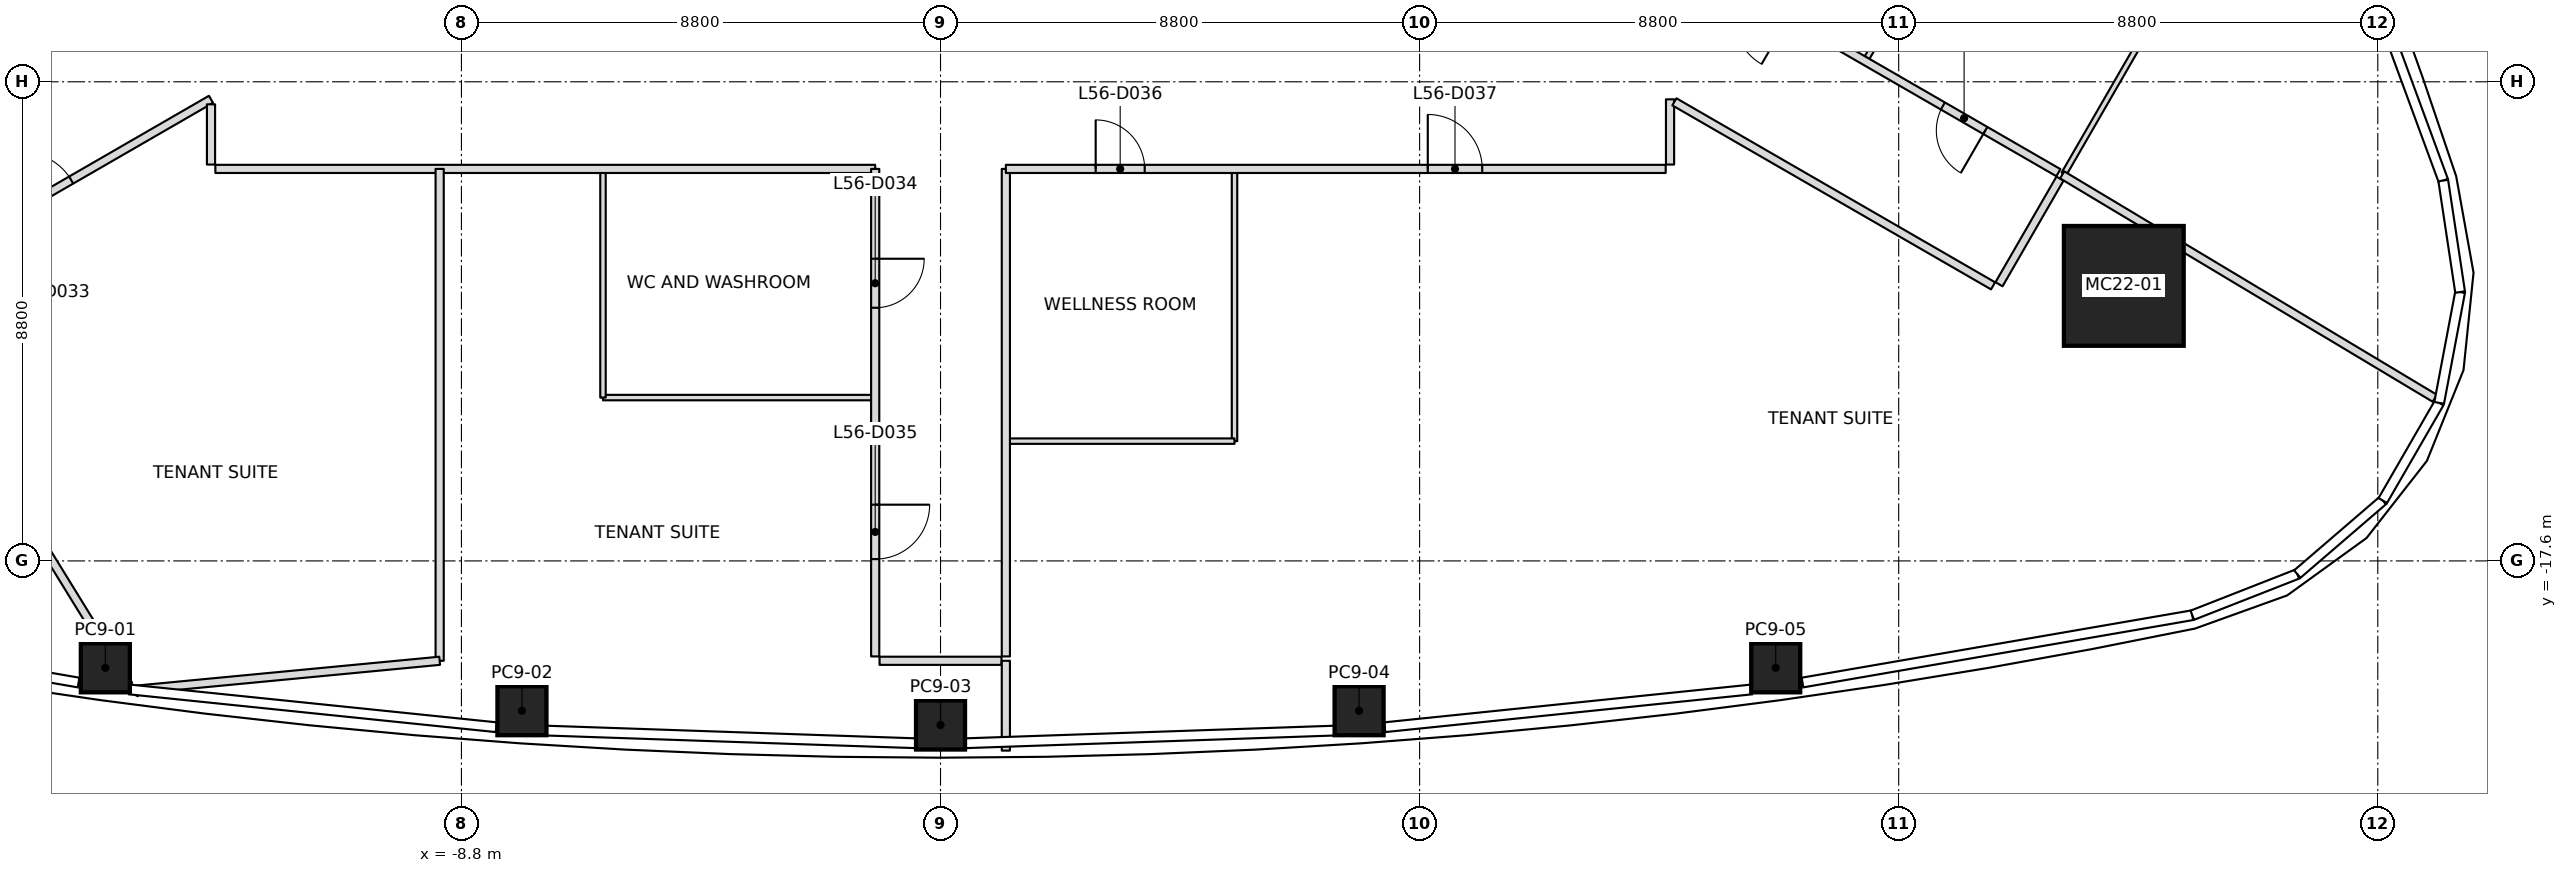
"""IFC4 building model, lengths in metres.
Left out: names, types, materials, properties, quantities, classifications, styles, units other than length and angle.
Written with IfcOpenShell. Run it as: python <this file> out.ifc"""

import sys

from ifc_helpers import new_model, si_unit, direction, frame, frame_2d, origin, origin_2d, place, context, subcontext, project, spatial, rectangle, extrude, element, fill, save


model = new_model("IFC4")
c1 = context("Model", 3, precision=1e-05, world=origin(), true_north=direction((0.0, 1.0)))
c2 = subcontext(c1, "Body", "Model", "MODEL_VIEW")
j1 = project(units=[si_unit("LENGTHUNIT", "METRE"), si_unit("PLANEANGLEUNIT", "RADIAN")], contexts=[c1])
p1 = place(None, origin())
s1 = spatial("IfcSite", under=j1, at=p1, CompositionType="ELEMENT")
p2 = place(p1, origin())
s2 = spatial("IfcBuilding", under=s1, at=p2, CompositionType="ELEMENT")
p3 = place(p2, frame((0.0, 0.0, 251.0)))
s3 = spatial("IfcBuildingStorey", under=s2, at=p3, CompositionType="ELEMENT", Elevation=251.0)
p4 = place(p3, frame((21.735, -12.549, 0.0), z_axis=(-0.027817649629, 0.016104955049, 0.999483270892), x_axis=(0.999613014306, 0.000448175434, 0.027814039075)))
e1 = element("IfcColumn", 1, at=p4, inside=s3, PredefinedType="COLUMN", context=c2, shape_type="SweptSolid", body=[
    extrude(rectangle(XDim=2.2, YDim=2.2, at=origin_2d()), origin(), (0.0, 0.0, 1.0), 4.002),
])
p5 = place(p3, frame((-15.341, -19.564, 0.0), z_axis=(0.017513449354, 0.010434842647, 0.99979217498), x_axis=(-0.990510670136, 0.136509968216, 0.015926108262)))
e2 = element("IfcColumn", 2, at=p5, inside=s3, PredefinedType="COLUMN", context=c2, shape_type="SweptSolid", body=[
    extrude(rectangle(XDim=0.9, YDim=0.9, at=origin_2d()), origin(), (0.0, 0.0, 1.0), 4.001),
])
p6 = place(p3, frame((-7.688, -20.351, 0.0), z_axis=(0.008788174922, 0.01116830563, 0.999899013366), x_axis=(-0.997624454716, 0.068420639532, 0.008003963894)))
e3 = element("IfcColumn", 3, at=p6, inside=s3, PredefinedType="COLUMN", context=c2, shape_type="SweptSolid", body=[
    extrude(rectangle(XDim=0.9, YDim=0.9, at=origin_2d()), origin(), (0.0, 0.0, 1.0), 4.0),
])
p7 = place(p3, frame((0.0, -20.614, 0.0), z_axis=(0.0, 0.01141283087, 0.999934871525), x_axis=(1.0, 0.0, 0.0)))
e4 = element("IfcColumn", 4, at=p7, inside=s3, PredefinedType="COLUMN", context=c2, shape_type="SweptSolid", body=[
    extrude(rectangle(XDim=0.9, YDim=0.9, at=origin_2d()), origin(), (0.0, 0.0, 1.0), 4.0),
])
p8 = place(p3, frame((7.688, -20.351, 0.0), z_axis=(-0.008788174922, 0.01116830563, 0.999899013366), x_axis=(0.997624454716, 0.068420639532, 0.008003963894)))
e5 = element("IfcColumn", 5, at=p8, inside=s3, PredefinedType="COLUMN", context=c2, shape_type="SweptSolid", body=[
    extrude(rectangle(XDim=0.9, YDim=0.9, at=origin_2d()), origin(), (0.0, 0.0, 1.0), 4.0),
])
p9 = place(p3, frame((15.341, -19.564, 0.0), z_axis=(-0.017513449354, 0.010434842647, 0.99979217498), x_axis=(0.990510670136, 0.136509968216, 0.015926108262)))
e6 = element("IfcColumn", 6, at=p9, inside=s3, PredefinedType="COLUMN", context=c2, shape_type="SweptSolid", body=[
    extrude(rectangle(XDim=0.9, YDim=0.9, at=origin_2d()), origin(), (0.0, 0.0, 1.0), 4.001),
])
p10 = place(p3, frame((-19.403, -12.588, 0.0), z_axis=(0.0, 0.0, 1.0), x_axis=(0.524407622251, -0.851467348596, 0.0)))
e7 = element("IfcWall", 7, at=p10, inside=s3, PredefinedType="PARTITIONING", context=c2, shape_type="SweptSolid", body=[
    extrude(rectangle(XDim=8.562, YDim=0.15, at=frame_2d((4.281, 0.0))), origin(), (0.0, 0.0, 1.0), 3.45),
])
p11 = place(p3, frame((-9.2, -10.4, 0.0), z_axis=(0.0, 0.0, 1.0), x_axis=(0.0, -1.0, 0.0)))
e8 = element("IfcWall", 8, at=p11, inside=s3, PredefinedType="PARTITIONING", context=c2, shape_type="SweptSolid", body=[
    extrude(rectangle(XDim=9.034, YDim=0.15, at=frame_2d((4.517, 0.0))), origin(), (0.0, 0.0, 1.0), 3.45),
])
p12 = place(p3, frame((-9.2, -19.434, 0.0), z_axis=(0.0, 0.0, 1.0), x_axis=(-0.995486828172, -0.094899815256, 0.0)))
e9 = element("IfcWall", 9, at=p12, inside=s3, PredefinedType="PARTITIONING", context=c2, shape_type="SweptSolid", body=[
    extrude(rectangle(XDim=5.588, YDim=0.15, at=frame_2d((2.794, 0.0))), origin(), (0.0, 0.0, 1.0), 3.234),
])
p13 = place(p3, frame((-14.812, -20.051, 0.0), z_axis=(0.0, 0.0, 1.0), x_axis=(0.448990893469, 0.893536332547, 0.0)))
e10 = element("IfcWall", 10, at=p13, inside=s3, PredefinedType="PARTITIONING", context=c2, shape_type="SweptSolid", body=[
    extrude(rectangle(XDim=0.11, YDim=0.15, at=frame_2d((0.055, 0.0))), origin(), (0.0, 0.0, 1.0), 3.45),
])
p14 = place(p3, frame((1.2, -19.434, 0.0), z_axis=(0.0, 0.0, 1.0), x_axis=(0.0, -1.0, 0.0)))
e11 = element("IfcWall", 11, at=p14, inside=s3, PredefinedType="PARTITIONING", context=c2, shape_type="SweptSolid", body=[
    extrude(rectangle(XDim=1.65, YDim=0.15, at=frame_2d((0.825, 0.0))), origin(), (0.0, 0.0, 1.0), 3.234),
])
p15 = place(p3, frame((20.603, -10.509, 0.0), z_axis=(0.0, 0.0, 1.0), x_axis=(0.85768451088, -0.514176311976, 0.0)))
e12 = element("IfcWall", 12, at=p15, inside=s3, PredefinedType="PARTITIONING", context=c2, shape_type="SweptSolid", body=[
    extrude(rectangle(XDim=7.981, YDim=0.15, at=frame_2d((3.99, 0.0))), origin(), (0.0, 0.0, 1.0), 3.234),
])
p16 = place(p3, frame((-13.4, -6.351, 0.0), z_axis=(0.0, 0.0, 1.0), x_axis=(-0.866025662596, -0.499999551726, 0.0)))
e13 = element("IfcWall", 13, at=p16, inside=s3, PredefinedType="PARTITIONING", context=c2, shape_type="SweptSolid", body=[
    extrude(rectangle(XDim=8.237, YDim=0.15, at=frame_2d((4.118, 0.0))), origin(), (0.0, 0.0, 1.0), 3.317),
])
p17 = place(p16, frame((1.35, 0.0, 0.0)))
e14 = element("IfcOpeningElement", 14, at=p17, cuts=e13, PredefinedType="OPENING", context=c2, shape_type="SweptSolid", body=[
    extrude(rectangle(XDim=0.9, YDim=2.1, at=frame_2d((0.45, 1.05))), frame((0.0, 0.075, 0.0), z_axis=(0.0, -1.0, 0.0), x_axis=(1.0, 0.0, 0.0)), (0.0, 0.0, 1.0), 0.15),
])
p18 = place(p16, frame((5.509, 0.0, 0.0)))
e15 = element("IfcOpeningElement", 15, at=p18, cuts=e13, PredefinedType="OPENING", context=c2, shape_type="SweptSolid", body=[
    extrude(rectangle(XDim=1.0, YDim=2.1, at=frame_2d((0.5, 1.05))), frame((0.0, 0.075, 0.0), z_axis=(0.0, -1.0, 0.0), x_axis=(1.0, 0.0, 0.0)), (0.0, 0.0, 1.0), 0.15),
])
p19 = place(p3, frame((-19.333, -12.548, 0.0), z_axis=(0.0, 0.0, 1.0), x_axis=(0.866030705461, 0.499990817114, 0.0)))
e16 = element("IfcWall", 16, at=p19, inside=s3, PredefinedType="PARTITIONING", context=c2, shape_type="SweptSolid", body=[
    extrude(rectangle(XDim=6.851, YDim=0.15, at=frame_2d((3.426, 0.0))), origin(), (0.0, 0.0, 1.0), 3.233),
])
p20 = place(p19, frame((2.885, 0.0, 0.0)))
e17 = element("IfcOpeningElement", 17, at=p20, cuts=e16, PredefinedType="OPENING", context=c2, shape_type="SweptSolid", body=[
    extrude(rectangle(XDim=1.0, YDim=2.1, at=frame_2d((0.5, 1.05))), frame((0.0, 0.075, 0.0), z_axis=(0.0, -1.0, 0.0), x_axis=(1.0, 0.0, 0.0)), (0.0, 0.0, 1.0), 0.15),
])
p21 = place(p3, frame((-13.4, -9.214, 0.0), z_axis=(0.0, 0.0, 1.0), x_axis=(0.0, -1.0, 0.0)))
e18 = element("IfcWall", 18, at=p21, inside=s3, PredefinedType="PARTITIONING", context=c2, shape_type="SweptSolid", body=[
    extrude(rectangle(XDim=1.106, YDim=0.15, at=frame_2d((0.553, 0.0))), origin(), (0.0, 0.0, 1.0), 3.233),
])
p22 = place(p3, frame((-13.32, -10.4, 0.0), z_axis=(0.0, 0.0, 1.0), x_axis=(1.0, 0.0, 0.0)))
e19 = element("IfcWall", 19, at=p22, inside=s3, PredefinedType="PARTITIONING", context=c2, shape_type="SweptSolid", body=[
    extrude(rectangle(XDim=12.12, YDim=0.15, at=frame_2d((6.06, 0.0))), origin(), (0.0, 0.0, 1.0), 3.317),
])
p23 = place(p3, frame((-1.2, -10.4, 0.0), z_axis=(0.0, 0.0, 1.0), x_axis=(0.0, -1.0, 0.0)))
e20 = element("IfcWall", 20, at=p23, inside=s3, PredefinedType="PARTITIONING", context=c2, shape_type="SweptSolid", body=[
    extrude(rectangle(XDim=8.954, YDim=0.15, at=frame_2d((4.477, 0.0))), origin(), (0.0, 0.0, 1.0), 3.45),
])
p24 = place(p23, frame((1.65, 0.0, 0.0)))
e21 = element("IfcOpeningElement", 21, at=p24, cuts=e20, PredefinedType="OPENING", context=c2, shape_type="SweptSolid", body=[
    extrude(rectangle(XDim=0.9, YDim=2.1, at=frame_2d((0.45, 1.05))), frame((0.0, 0.075, 0.0), z_axis=(0.0, -1.0, 0.0), x_axis=(1.0, 0.0, 0.0)), (0.0, 0.0, 1.0), 0.15),
])
p25 = place(p23, frame((6.167, 0.0, 0.0)))
e22 = element("IfcOpeningElement", 22, at=p25, cuts=e20, PredefinedType="OPENING", context=c2, shape_type="SweptSolid", body=[
    extrude(rectangle(XDim=1.0, YDim=2.1, at=frame_2d((0.5, 1.05))), frame((0.0, 0.075, 0.0), z_axis=(0.0, -1.0, 0.0), x_axis=(1.0, 0.0, 0.0)), (0.0, 0.0, 1.0), 0.15),
])
p26 = place(p3, frame((-1.12, -19.434, 0.0), z_axis=(0.0, 0.0, 1.0), x_axis=(1.0, 0.0, 0.0)))
e23 = element("IfcWall", 23, at=p26, inside=s3, PredefinedType="PARTITIONING", context=c2, shape_type="SweptSolid", body=[
    extrude(rectangle(XDim=2.24, YDim=0.15, at=frame_2d((1.12, 0.0))), origin(), (0.0, 0.0, 1.0), 3.45),
])
p27 = place(p3, frame((1.2, -19.354, 0.0), z_axis=(0.0, 0.0, 1.0), x_axis=(0.0, 1.0, 0.0)))
e24 = element("IfcWall", 24, at=p27, inside=s3, PredefinedType="PARTITIONING", context=c2, shape_type="SweptSolid", body=[
    extrude(rectangle(XDim=8.954, YDim=0.15, at=frame_2d((4.477, 0.0))), origin(), (0.0, 0.0, 1.0), 3.45),
])
p28 = place(p3, frame((1.2, -10.4, 0.0), z_axis=(0.0, 0.0, 1.0), x_axis=(1.0, 0.0, 0.0)))
e25 = element("IfcWall", 25, at=p28, inside=s3, PredefinedType="PARTITIONING", context=c2, shape_type="SweptSolid", body=[
    extrude(rectangle(XDim=12.12, YDim=0.15, at=frame_2d((6.06, 0.0))), origin(), (0.0, 0.0, 1.0), 3.317),
])
p29 = place(p28, frame((1.65, 0.0, 0.0)))
e26 = element("IfcOpeningElement", 26, at=p29, cuts=e25, PredefinedType="OPENING", context=c2, shape_type="SweptSolid", body=[
    extrude(rectangle(XDim=0.9, YDim=2.1, at=frame_2d((0.45, 1.05))), frame((0.0, 0.075, 0.0), z_axis=(0.0, -1.0, 0.0), x_axis=(1.0, 0.0, 0.0)), (0.0, 0.0, 1.0), 0.15),
])
p30 = place(p28, frame((7.75, 0.0, 0.0)))
e27 = element("IfcOpeningElement", 27, at=p30, cuts=e25, PredefinedType="OPENING", context=c2, shape_type="SweptSolid", body=[
    extrude(rectangle(XDim=1.0, YDim=2.1, at=frame_2d((0.5, 1.05))), frame((0.0, 0.075, 0.0), z_axis=(0.0, -1.0, 0.0), x_axis=(1.0, 0.0, 0.0)), (0.0, 0.0, 1.0), 0.15),
])
p31 = place(p3, frame((13.4, -10.32, 0.0), z_axis=(0.0, 0.0, 1.0), x_axis=(0.0, 1.0, 0.0)))
e28 = element("IfcWall", 28, at=p31, inside=s3, PredefinedType="PARTITIONING", context=c2, shape_type="SweptSolid", body=[
    extrude(rectangle(XDim=1.198, YDim=0.15, at=frame_2d((0.599, 0.0))), origin(), (0.0, 0.0, 1.0), 3.233),
])
p32 = place(p3, frame((13.479, -9.168, 0.0), z_axis=(0.0, 0.0, 1.0), x_axis=(0.866036425609, -0.499980909154, 0.0)))
e29 = element("IfcWall", 29, at=p32, inside=s3, PredefinedType="PARTITIONING", context=c2, shape_type="SweptSolid", body=[
    extrude(rectangle(XDim=6.76, YDim=0.15, at=frame_2d((3.38, 0.0))), origin(), (0.0, 0.0, 1.0), 3.233),
])
p33 = place(p3, frame((20.533, -10.469, 0.0), z_axis=(0.0, 0.0, 1.0), x_axis=(-0.866025662596, 0.499999551726, 0.0)))
e30 = element("IfcWall", 30, at=p33, inside=s3, PredefinedType="PARTITIONING", context=c2, shape_type="SweptSolid", body=[
    extrude(rectangle(XDim=8.237, YDim=0.15, at=frame_2d((4.118, 0.0))), origin(), (0.0, 0.0, 1.0), 3.317),
])
p34 = place(p33, frame((1.55, 0.0, 0.0)))
e31 = element("IfcOpeningElement", 31, at=p34, cuts=e30, PredefinedType="OPENING", context=c2, shape_type="SweptSolid", body=[
    extrude(rectangle(XDim=0.9, YDim=2.1, at=frame_2d((0.45, 1.05))), frame((0.0, 0.075, 0.0), z_axis=(0.0, -1.0, 0.0), x_axis=(1.0, 0.0, 0.0)), (0.0, 0.0, 1.0), 0.15),
])
p35 = place(p33, frame((5.719, 0.0, 0.0)))
e32 = element("IfcOpeningElement", 32, at=p35, cuts=e30, PredefinedType="OPENING", context=c2, shape_type="SweptSolid", body=[
    extrude(rectangle(XDim=1.0, YDim=2.1, at=frame_2d((0.5, 1.05))), frame((0.0, 0.075, 0.0), z_axis=(0.0, -1.0, 0.0), x_axis=(1.0, 0.0, 0.0)), (0.0, 0.0, 1.0), 0.15),
])
p36 = place(p3, frame((19.443, -12.519, 0.0), z_axis=(0.0, 0.0, 1.0), x_axis=(0.49994888933, 0.866054910533, 0.0)))
e33 = element("IfcWall", 33, at=p36, inside=s3, PredefinedType="PARTITIONING", context=c2, shape_type="SweptSolid", body=[
    extrude(rectangle(XDim=2.24, YDim=0.15, at=frame_2d((1.12, 0.0))), origin(), (0.0, 0.0, 1.0), 3.233),
])
p37 = place(p3, frame((-1.23, -14.6, 0.0), z_axis=(0.0, 0.0, 1.0), x_axis=(-1.0, 0.0, 0.0)))
e34 = element("IfcWall", 34, at=p37, inside=s3, PredefinedType="PARTITIONING", context=c2, shape_type="SweptSolid", body=[
    extrude(rectangle(XDim=4.97, YDim=0.1, at=frame_2d((2.485, 0.0))), origin(), (0.0, 0.0, 1.0), 3.317),
])
p38 = place(p3, frame((-6.2, -14.6, 0.0), z_axis=(0.0, 0.0, 1.0), x_axis=(0.0, 1.0, 0.0)))
e35 = element("IfcWall", 35, at=p38, inside=s3, PredefinedType="PARTITIONING", context=c2, shape_type="SweptSolid", body=[
    extrude(rectangle(XDim=4.17, YDim=0.1, at=frame_2d((2.085, 0.0))), origin(), (0.0, 0.0, 1.0), 3.45),
])
p39 = place(p3, frame((5.4, -10.43, 0.0), z_axis=(0.0, 0.0, 1.0), x_axis=(0.0, -1.0, 0.0)))
e36 = element("IfcWall", 36, at=p39, inside=s3, PredefinedType="PARTITIONING", context=c2, shape_type="SweptSolid", body=[
    extrude(rectangle(XDim=4.97, YDim=0.1, at=frame_2d((2.485, 0.0))), origin(), (0.0, 0.0, 1.0), 3.45),
])
p40 = place(p3, frame((5.4, -15.4, 0.0), z_axis=(0.0, 0.0, 1.0), x_axis=(-1.0, 0.0, 0.0)))
e37 = element("IfcWall", 37, at=p40, inside=s3, PredefinedType="PARTITIONING", context=c2, shape_type="SweptSolid", body=[
    extrude(rectangle(XDim=4.17, YDim=0.1, at=frame_2d((2.085, 0.0))), origin(), (0.0, 0.0, 1.0), 3.317),
])
p41 = place(p3, frame((16.998, -8.393, 0.0), z_axis=(0.0, 0.0, 1.0), x_axis=(0.500011595943, 0.86601870876, 0.0)))
e38 = element("IfcWall", 38, at=p41, inside=s3, PredefinedType="PARTITIONING", context=c2, shape_type="SweptSolid", body=[
    extrude(rectangle(XDim=4.97, YDim=0.1, at=frame_2d((2.485, 0.0))), origin(), (0.0, 0.0, 1.0), 3.317),
])
p42 = place(p3, frame((23.12, -6.189, 0.0), z_axis=(0.0, 0.0, 1.0), x_axis=(-0.499974753747, -0.866039979225, 0.0)))
e39 = element("IfcWall", 39, at=p42, inside=s3, PredefinedType="PARTITIONING", context=c2, shape_type="SweptSolid", body=[
    extrude(rectangle(XDim=4.97, YDim=0.1, at=frame_2d((2.485, 0.0))), origin(), (0.0, 0.0, 1.0), 3.443),
])
p43 = place(p20, origin())
e40 = element("IfcDoor", 40, at=p43, inside=s3, OperationType="SINGLE_SWING_LEFT", PredefinedType="DOOR", context=c2, shape_type="SweptSolid", body=[
    extrude(rectangle(XDim=1.0, YDim=2.1, at=frame_2d((0.5, 1.05))), frame((0.0, 0.025, 0.0), z_axis=(0.0, -1.0, 0.0), x_axis=(1.0, 0.0, 0.0)), (0.0, 0.0, 1.0), 0.05),
])
fill(e17, e40)
p44 = place(p24, origin())
e41 = element("IfcDoor", 41, at=p44, inside=s3, OperationType="SINGLE_SWING_LEFT", PredefinedType="DOOR", context=c2, shape_type="SweptSolid", body=[
    extrude(rectangle(XDim=0.9, YDim=2.1, at=frame_2d((0.45, 1.05))), frame((0.0, 0.025, 0.0), z_axis=(0.0, -1.0, 0.0), x_axis=(1.0, 0.0, 0.0)), (0.0, 0.0, 1.0), 0.05),
])
fill(e21, e41)
p45 = place(p25, origin())
e42 = element("IfcDoor", 42, at=p45, inside=s3, OperationType="SINGLE_SWING_RIGHT", PredefinedType="DOOR", context=c2, shape_type="SweptSolid", body=[
    extrude(rectangle(XDim=1.0, YDim=2.1, at=frame_2d((0.5, 1.05))), frame((0.0, 0.025, 0.0), z_axis=(0.0, -1.0, 0.0), x_axis=(1.0, 0.0, 0.0)), (0.0, 0.0, 1.0), 0.05),
])
fill(e22, e42)
p46 = place(p29, origin())
e43 = element("IfcDoor", 43, at=p46, inside=s3, OperationType="SINGLE_SWING_RIGHT", PredefinedType="DOOR", context=c2, shape_type="SweptSolid", body=[
    extrude(rectangle(XDim=0.9, YDim=2.1, at=frame_2d((0.45, 1.05))), frame((0.0, 0.025, 0.0), z_axis=(0.0, -1.0, 0.0), x_axis=(1.0, 0.0, 0.0)), (0.0, 0.0, 1.0), 0.05),
])
fill(e26, e43)
p47 = place(p30, origin())
e44 = element("IfcDoor", 44, at=p47, inside=s3, OperationType="SINGLE_SWING_RIGHT", PredefinedType="DOOR", context=c2, shape_type="SweptSolid", body=[
    extrude(rectangle(XDim=1.0, YDim=2.1, at=frame_2d((0.5, 1.05))), frame((0.0, 0.025, 0.0), z_axis=(0.0, -1.0, 0.0), x_axis=(1.0, 0.0, 0.0)), (0.0, 0.0, 1.0), 0.05),
])
fill(e27, e44)
p48 = place(p34, origin())
e45 = element("IfcDoor", 45, at=p48, inside=s3, OperationType="SINGLE_SWING_LEFT", PredefinedType="DOOR", context=c2, shape_type="SweptSolid", body=[
    extrude(rectangle(XDim=0.9, YDim=2.1, at=frame_2d((0.45, 1.05))), frame((0.0, 0.025, 0.0), z_axis=(0.0, -1.0, 0.0), x_axis=(1.0, 0.0, 0.0)), (0.0, 0.0, 1.0), 0.05),
])
fill(e31, e45)
save(model, sys.argv[1])
